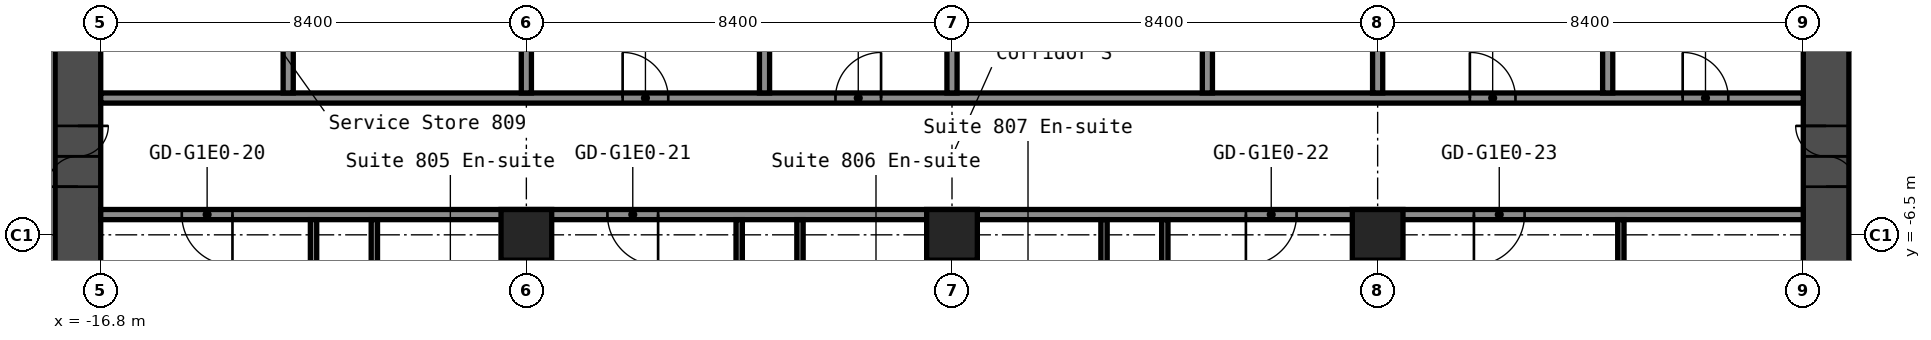
"""IFC4 building model, lengths in metres.
Left out: names, types, materials, properties, quantities, classifications, styles, units other than length and angle.
Written with IfcOpenShell. Run it as: python <this file> out.ifc"""

import sys

from ifc_helpers import new_model, si_unit, direction, frame, frame_2d, origin, origin_2d, place, context, subcontext, project, spatial, rectangle, hollow_rectangle, extrude, element, fill, save


model = new_model("IFC4")
c1 = context("Model", 3, precision=1e-05, world=origin(), true_north=direction((0.0, 1.0)))
c2 = subcontext(c1, "Body", "Model", "MODEL_VIEW")
j1 = project(units=[si_unit("LENGTHUNIT", "METRE"), si_unit("PLANEANGLEUNIT", "RADIAN")], contexts=[c1])
p1 = place(None, origin())
s1 = spatial("IfcSite", under=j1, at=p1, CompositionType="ELEMENT")
p2 = place(p1, origin())
s2 = spatial("IfcBuilding", under=s1, at=p2, CompositionType="ELEMENT")
p3 = place(p2, frame((0.0, 0.0, 32.6)))
s3 = spatial("IfcBuildingStorey", under=s2, at=p3, CompositionType="ELEMENT", Elevation=32.6)
for number, where, z_axis, x_axis in (
    (1, (-8.4, -6.5, 0.0), (0.0, 0.0, 1.0), (1.0, 0.0, 0.0)),
    (2, (0.0, -6.5, 0.0), (0.0, 0.0, 1.0), (1.0, 0.0, 0.0)),
    (3, (8.4, -6.5, 0.0), (0.0, 0.0, 1.0), (1.0, 0.0, 0.0)),
):
    element("IfcColumn", number, at=place(p3, frame(where, z_axis=z_axis, x_axis=x_axis)), inside=s3, PredefinedType="COLUMN", context=c2, shape_type="SweptSolid", body=[
        extrude(hollow_rectangle(XDim=1.0, YDim=1.0, WallThickness=0.04, at=origin_2d()), origin(), (0.0, 0.0, 1.0), 2.8),
    ])
p4 = place(p3, frame((-17.25, -8.4, 0.0), z_axis=(0.0, 0.0, 1.0), x_axis=(0.0, 1.0, 0.0)))
e4 = element("IfcWall", 4, at=p4, inside=s3, PredefinedType="SHEAR", context=c2, shape_type="SweptSolid", body=[
    extrude(rectangle(XDim=16.8, YDim=0.9, at=frame_2d((8.4, 0.0))), origin(), (0.0, 0.0, 1.0), 2.8),
])
p5 = place(p4, frame((12.75, 0.0, 0.0)))
e5 = element("IfcOpeningElement", 5, at=p5, cuts=e4, PredefinedType="OPENING", context=c2, shape_type="SweptSolid", body=[
    extrude(rectangle(XDim=1.2, YDim=2.1, at=frame_2d((0.6, 1.05))), frame((0.0, 0.46, 0.0), z_axis=(0.0, -1.0, 0.0), x_axis=(1.0, 0.0, 0.0)), (0.0, 0.0, 1.0), 0.92),
])
p6 = place(p4, frame((2.85, 0.0, 0.0)))
e6 = element("IfcOpeningElement", 6, at=p6, cuts=e4, PredefinedType="OPENING", context=c2, shape_type="SweptSolid", body=[
    extrude(rectangle(XDim=1.2, YDim=2.1, at=frame_2d((0.6, 1.05))), frame((0.0, 0.46, 0.0), z_axis=(0.0, -1.0, 0.0), x_axis=(1.0, 0.0, 0.0)), (0.0, 0.0, 1.0), 0.92),
])
p7 = place(p3, frame((17.25, -8.4, 0.0), z_axis=(0.0, 0.0, 1.0), x_axis=(0.0, 1.0, 0.0)))
e7 = element("IfcWall", 7, at=p7, inside=s3, PredefinedType="SHEAR", context=c2, shape_type="SweptSolid", body=[
    extrude(rectangle(XDim=16.8, YDim=0.9, at=frame_2d((8.4, 0.0))), origin(), (0.0, 0.0, 1.0), 2.8),
])
p8 = place(p7, frame((12.75, 0.0, 0.0)))
e8 = element("IfcOpeningElement", 8, at=p8, cuts=e7, PredefinedType="OPENING", context=c2, shape_type="SweptSolid", body=[
    extrude(rectangle(XDim=1.2, YDim=2.1, at=frame_2d((0.6, 1.05))), frame((0.0, 0.46, 0.0), z_axis=(0.0, -1.0, 0.0), x_axis=(1.0, 0.0, 0.0)), (0.0, 0.0, 1.0), 0.92),
])
p9 = place(p7, frame((2.85, 0.0, 0.0)))
e9 = element("IfcOpeningElement", 9, at=p9, cuts=e7, PredefinedType="OPENING", context=c2, shape_type="SweptSolid", body=[
    extrude(rectangle(XDim=1.2, YDim=2.1, at=frame_2d((0.6, 1.05))), frame((0.0, 0.46, 0.0), z_axis=(0.0, -1.0, 0.0), x_axis=(1.0, 0.0, 0.0)), (0.0, 0.0, 1.0), 0.92),
])
p10 = place(p3, frame((-16.8, -6.1, 0.0), z_axis=(0.0, 0.0, 1.0), x_axis=(1.0, 0.0, 0.0)))
e10 = element("IfcWall", 10, at=p10, inside=s3, PredefinedType="PARTITIONING", context=c2, shape_type="SweptSolid", body=[
    extrude(rectangle(XDim=33.6, YDim=0.2, at=frame_2d((16.8, 0.0))), origin(), (0.0, 0.0, 1.0), 2.8),
])
p11 = place(p10, frame((1.6, 0.0, 0.0)))
e11 = element("IfcOpeningElement", 11, at=p11, cuts=e10, PredefinedType="OPENING", context=c2, shape_type="SweptSolid", body=[
    extrude(rectangle(XDim=1.0, YDim=2.1, at=frame_2d((0.5, 1.05))), frame((0.0, 0.11, 0.0), z_axis=(0.0, -1.0, 0.0), x_axis=(1.0, 0.0, 0.0)), (0.0, 0.0, 1.0), 0.22),
])
p12 = place(p10, frame((10.0, 0.0, 0.0)))
e12 = element("IfcOpeningElement", 12, at=p12, cuts=e10, PredefinedType="OPENING", context=c2, shape_type="SweptSolid", body=[
    extrude(rectangle(XDim=1.0, YDim=2.1, at=frame_2d((0.5, 1.05))), frame((0.0, 0.11, 0.0), z_axis=(0.0, -1.0, 0.0), x_axis=(1.0, 0.0, 0.0)), (0.0, 0.0, 1.0), 0.22),
])
p13 = place(p10, frame((22.6, 0.0, 0.0)))
e13 = element("IfcOpeningElement", 13, at=p13, cuts=e10, PredefinedType="OPENING", context=c2, shape_type="SweptSolid", body=[
    extrude(rectangle(XDim=1.0, YDim=2.1, at=frame_2d((0.5, 1.05))), frame((0.0, 0.11, 0.0), z_axis=(0.0, -1.0, 0.0), x_axis=(1.0, 0.0, 0.0)), (0.0, 0.0, 1.0), 0.22),
])
p14 = place(p10, frame((27.1, 0.0, 0.0)))
e14 = element("IfcOpeningElement", 14, at=p14, cuts=e10, PredefinedType="OPENING", context=c2, shape_type="SweptSolid", body=[
    extrude(rectangle(XDim=1.0, YDim=2.1, at=frame_2d((0.5, 1.05))), frame((0.0, 0.11, 0.0), z_axis=(0.0, -1.0, 0.0), x_axis=(1.0, 0.0, 0.0)), (0.0, 0.0, 1.0), 0.22),
])
p15 = place(p3, frame((-16.8, -3.8, 0.0), z_axis=(0.0, 0.0, 1.0), x_axis=(1.0, 0.0, 0.0)))
e15 = element("IfcWall", 15, at=p15, inside=s3, PredefinedType="PARTITIONING", context=c2, shape_type="SweptSolid", body=[
    extrude(rectangle(XDim=33.6, YDim=0.2, at=frame_2d((16.8, 0.0))), origin(), (0.0, 0.0, 1.0), 2.8),
])
p16 = place(p15, frame((10.3, 0.0, 0.0)))
e16 = element("IfcOpeningElement", 16, at=p16, cuts=e15, PredefinedType="OPENING", context=c2, shape_type="SweptSolid", body=[
    extrude(rectangle(XDim=0.9, YDim=2.1, at=frame_2d((0.45, 1.05))), frame((0.0, 0.11, 0.0), z_axis=(0.0, -1.0, 0.0), x_axis=(1.0, 0.0, 0.0)), (0.0, 0.0, 1.0), 0.22),
])
p17 = place(p15, frame((14.5, 0.0, 0.0)))
e17 = element("IfcOpeningElement", 17, at=p17, cuts=e15, PredefinedType="OPENING", context=c2, shape_type="SweptSolid", body=[
    extrude(rectangle(XDim=0.9, YDim=2.1, at=frame_2d((0.45, 1.05))), frame((0.0, 0.11, 0.0), z_axis=(0.0, -1.0, 0.0), x_axis=(1.0, 0.0, 0.0)), (0.0, 0.0, 1.0), 0.22),
])
p18 = place(p15, frame((27.02, 0.0, 0.0)))
e18 = element("IfcOpeningElement", 18, at=p18, cuts=e15, PredefinedType="OPENING", context=c2, shape_type="SweptSolid", body=[
    extrude(rectangle(XDim=0.9, YDim=2.1, at=frame_2d((0.45, 1.05))), frame((0.0, 0.11, 0.0), z_axis=(0.0, -1.0, 0.0), x_axis=(1.0, 0.0, 0.0)), (0.0, 0.0, 1.0), 0.22),
])
p19 = place(p15, frame((31.22, 0.0, 0.0)))
e19 = element("IfcOpeningElement", 19, at=p19, cuts=e15, PredefinedType="OPENING", context=c2, shape_type="SweptSolid", body=[
    extrude(rectangle(XDim=0.9, YDim=2.1, at=frame_2d((0.45, 1.05))), frame((0.0, 0.11, 0.0), z_axis=(0.0, -1.0, 0.0), x_axis=(1.0, 0.0, 0.0)), (0.0, 0.0, 1.0), 0.22),
])
p20 = place(p3, frame((-13.1, -3.7, 0.0), z_axis=(0.0, 0.0, 1.0), x_axis=(0.0, 1.0, 0.0)))
e20 = element("IfcWall", 20, at=p20, inside=s3, PredefinedType="PARTITIONING", context=c2, shape_type="SweptSolid", body=[
    extrude(rectangle(XDim=7.4, YDim=0.2, at=frame_2d((3.7, 0.0))), origin(), (0.0, 0.0, 1.0), 2.8),
])
p21 = place(p3, frame((-12.6, -20.3, 0.0), z_axis=(0.0, 0.0, 1.0), x_axis=(0.0, 1.0, 0.0)))
e21 = element("IfcWall", 21, at=p21, inside=s3, PredefinedType="PARTITIONING", context=c2, shape_type="SweptSolid", body=[
    extrude(rectangle(XDim=14.1, YDim=0.125, at=frame_2d((7.05, 0.0))), origin(), (0.0, 0.0, 1.0), 2.8),
])
p22 = place(p21, frame((9.15, 0.0, 0.0)))
e22 = element("IfcOpeningElement", 22, at=p22, cuts=e21, PredefinedType="OPENING", context=c2, shape_type="SweptSolid", body=[
    extrude(rectangle(XDim=0.9, YDim=2.1, at=frame_2d((0.45, 1.05))), frame((0.0, 0.073, 0.0), z_axis=(0.0, -1.0, 0.0), x_axis=(1.0, 0.0, 0.0)), (0.0, 0.0, 1.0), 0.145),
])
p23 = place(p3, frame((-11.4, -9.3, 0.0), z_axis=(0.0, 0.0, 1.0), x_axis=(0.0, 1.0, 0.0)))
e23 = element("IfcWall", 23, at=p23, inside=s3, PredefinedType="PARTITIONING", context=c2, shape_type="SweptSolid", body=[
    extrude(rectangle(XDim=3.1, YDim=0.125, at=frame_2d((1.55, 0.0))), origin(), (0.0, 0.0, 1.0), 2.8),
])
p24 = place(p3, frame((-8.4, -20.3, 0.0), z_axis=(0.0, 0.0, 1.0), x_axis=(0.0, 1.0, 0.0)))
e24 = element("IfcWall", 24, at=p24, inside=s3, PredefinedType="PARTITIONING", context=c2, shape_type="SweptSolid", body=[
    extrude(rectangle(XDim=13.31, YDim=0.2, at=frame_2d((6.655, 0.0))), origin(), (0.0, 0.0, 1.0), 2.8),
])
p25 = place(p3, frame((-8.4, -3.7, 0.0), z_axis=(0.0, 0.0, 1.0), x_axis=(0.0, 1.0, 0.0)))
e25 = element("IfcWall", 25, at=p25, inside=s3, PredefinedType="PARTITIONING", context=c2, shape_type="SweptSolid", body=[
    extrude(rectangle(XDim=7.4, YDim=0.2, at=frame_2d((3.7, 0.0))), origin(), (0.0, 0.0, 1.0), 2.8),
])
p26 = place(p3, frame((-4.2, -20.3, 0.0), z_axis=(0.0, 0.0, 1.0), x_axis=(0.0, 1.0, 0.0)))
e26 = element("IfcWall", 26, at=p26, inside=s3, PredefinedType="PARTITIONING", context=c2, shape_type="SweptSolid", body=[
    extrude(rectangle(XDim=14.1, YDim=0.125, at=frame_2d((7.05, 0.0))), origin(), (0.0, 0.0, 1.0), 2.8),
])
p27 = place(p26, frame((9.15, 0.0, 0.0)))
e27 = element("IfcOpeningElement", 27, at=p27, cuts=e26, PredefinedType="OPENING", context=c2, shape_type="SweptSolid", body=[
    extrude(rectangle(XDim=0.9, YDim=2.1, at=frame_2d((0.45, 1.05))), frame((0.0, 0.073, 0.0), z_axis=(0.0, -1.0, 0.0), x_axis=(1.0, 0.0, 0.0)), (0.0, 0.0, 1.0), 0.145),
])
p28 = place(p3, frame((-3.7, -3.7, 0.0), z_axis=(0.0, 0.0, 1.0), x_axis=(0.0, 1.0, 0.0)))
e28 = element("IfcWall", 28, at=p28, inside=s3, PredefinedType="PARTITIONING", context=c2, shape_type="SweptSolid", body=[
    extrude(rectangle(XDim=7.4, YDim=0.2, at=frame_2d((3.7, 0.0))), origin(), (0.0, 0.0, 1.0), 2.8),
])
p29 = place(p3, frame((-3.0, -9.3, 0.0), z_axis=(0.0, 0.0, 1.0), x_axis=(0.0, 1.0, 0.0)))
e29 = element("IfcWall", 29, at=p29, inside=s3, PredefinedType="PARTITIONING", context=c2, shape_type="SweptSolid", body=[
    extrude(rectangle(XDim=3.1, YDim=0.125, at=frame_2d((1.55, 0.0))), origin(), (0.0, 0.0, 1.0), 2.8),
])
p30 = place(p3, frame((0.0, -20.3, 0.0), z_axis=(0.0, 0.0, 1.0), x_axis=(0.0, 1.0, 0.0)))
e30 = element("IfcWall", 30, at=p30, inside=s3, PredefinedType="PARTITIONING", context=c2, shape_type="SweptSolid", body=[
    extrude(rectangle(XDim=13.31, YDim=0.2, at=frame_2d((6.655, 0.0))), origin(), (0.0, 0.0, 1.0), 2.8),
])
p31 = place(p3, frame((0.0, -3.7, 0.0), z_axis=(0.0, 0.0, 1.0), x_axis=(0.0, 1.0, 0.0)))
e31 = element("IfcWall", 31, at=p31, inside=s3, PredefinedType="PARTITIONING", context=c2, shape_type="SweptSolid", body=[
    extrude(rectangle(XDim=7.4, YDim=0.2, at=frame_2d((3.7, 0.0))), origin(), (0.0, 0.0, 1.0), 2.8),
])
p32 = place(p3, frame((3.0, -9.3, 0.0), z_axis=(0.0, 0.0, 1.0), x_axis=(0.0, 1.0, 0.0)))
e32 = element("IfcWall", 32, at=p32, inside=s3, PredefinedType="PARTITIONING", context=c2, shape_type="SweptSolid", body=[
    extrude(rectangle(XDim=3.1, YDim=0.125, at=frame_2d((1.55, 0.0))), origin(), (0.0, 0.0, 1.0), 2.8),
])
p33 = place(p3, frame((4.2, -20.3, 0.0), z_axis=(0.0, 0.0, 1.0), x_axis=(0.0, 1.0, 0.0)))
e33 = element("IfcWall", 33, at=p33, inside=s3, PredefinedType="PARTITIONING", context=c2, shape_type="SweptSolid", body=[
    extrude(rectangle(XDim=14.1, YDim=0.125, at=frame_2d((7.05, 0.0))), origin(), (0.0, 0.0, 1.0), 2.8),
])
p34 = place(p33, frame((9.15, 0.0, 0.0)))
e34 = element("IfcOpeningElement", 34, at=p34, cuts=e33, PredefinedType="OPENING", context=c2, shape_type="SweptSolid", body=[
    extrude(rectangle(XDim=0.9, YDim=2.1, at=frame_2d((0.45, 1.05))), frame((0.0, 0.073, 0.0), z_axis=(0.0, -1.0, 0.0), x_axis=(1.0, 0.0, 0.0)), (0.0, 0.0, 1.0), 0.145),
])
p35 = place(p3, frame((5.04, -3.7, 0.0), z_axis=(0.0, 0.0, 1.0), x_axis=(0.0, 1.0, 0.0)))
e35 = element("IfcWall", 35, at=p35, inside=s3, PredefinedType="PARTITIONING", context=c2, shape_type="SweptSolid", body=[
    extrude(rectangle(XDim=7.4, YDim=0.2, at=frame_2d((3.7, 0.0))), origin(), (0.0, 0.0, 1.0), 2.8),
])
p36 = place(p3, frame((8.4, -20.3, 0.0), z_axis=(0.0, 0.0, 1.0), x_axis=(0.0, 1.0, 0.0)))
e36 = element("IfcWall", 36, at=p36, inside=s3, PredefinedType="PARTITIONING", context=c2, shape_type="SweptSolid", body=[
    extrude(rectangle(XDim=13.31, YDim=0.2, at=frame_2d((6.655, 0.0))), origin(), (0.0, 0.0, 1.0), 2.8),
])
for number, where, z_axis, x_axis in (
    (37, (8.4, -3.7, 0.0), (0.0, 0.0, 1.0), (0.0, 1.0, 0.0)),
    (38, (12.94, -3.7, 0.0), (0.0, 0.0, 1.0), (0.0, 1.0, 0.0)),
):
    element("IfcWall", number, at=place(p3, frame(where, z_axis=z_axis, x_axis=x_axis)), inside=s3, PredefinedType="PARTITIONING", context=c2, shape_type="SweptSolid", body=[
        extrude(rectangle(XDim=7.4, YDim=0.2, at=frame_2d((3.7, 0.0))), origin(), (0.0, 0.0, 1.0), 2.8),
    ])
p37 = place(p3, frame((13.2, -9.5, 0.0), z_axis=(0.0, 0.0, 1.0), x_axis=(0.0, 1.0, 0.0)))
e39 = element("IfcWall", 39, at=p37, inside=s3, PredefinedType="PARTITIONING", context=c2, shape_type="SweptSolid", body=[
    extrude(rectangle(XDim=3.3, YDim=0.125, at=frame_2d((1.65, 0.0))), origin(), (0.0, 0.0, 1.0), 2.8),
])
p38 = place(p37, frame((1.2, 0.0, 0.0)))
e40 = element("IfcOpeningElement", 40, at=p38, cuts=e39, PredefinedType="OPENING", context=c2, shape_type="SweptSolid", body=[
    extrude(rectangle(XDim=1.0, YDim=2.1, at=frame_2d((0.5, 1.05))), frame((0.0, 0.073, 0.0), z_axis=(0.0, -1.0, 0.0), x_axis=(1.0, 0.0, 0.0)), (0.0, 0.0, 1.0), 0.145),
])
p39 = place(p6, origin())
e41 = element("IfcDoor", 41, at=p39, inside=s3, OperationType="DOUBLE_DOOR_SINGLE_SWING", PredefinedType="DOOR", context=c2, shape_type="SweptSolid", body=[
    extrude(rectangle(XDim=1.2, YDim=2.1, at=frame_2d((0.6, 1.05))), frame((0.0, 0.025, 0.0), z_axis=(0.0, -1.0, 0.0), x_axis=(1.0, 0.0, 0.0)), (0.0, 0.0, 1.0), 0.05),
])
fill(e6, e41)
p40 = place(p9, origin())
e42 = element("IfcDoor", 42, at=p40, inside=s3, OperationType="DOUBLE_DOOR_SINGLE_SWING", PredefinedType="DOOR", context=c2, shape_type="SweptSolid", body=[
    extrude(rectangle(XDim=1.2, YDim=2.1, at=frame_2d((0.6, 1.05))), frame((0.0, 0.025, 0.0), z_axis=(0.0, -1.0, 0.0), x_axis=(1.0, 0.0, 0.0)), (0.0, 0.0, 1.0), 0.05),
])
fill(e9, e42)
p41 = place(p11, origin())
e43 = element("IfcDoor", 43, at=p41, inside=s3, OperationType="SINGLE_SWING_RIGHT", PredefinedType="DOOR", context=c2, shape_type="SweptSolid", body=[
    extrude(rectangle(XDim=1.0, YDim=2.1, at=frame_2d((0.5, 1.05))), frame((0.0, 0.025, 0.0), z_axis=(0.0, -1.0, 0.0), x_axis=(1.0, 0.0, 0.0)), (0.0, 0.0, 1.0), 0.05),
])
fill(e11, e43)
p42 = place(p12, origin())
e44 = element("IfcDoor", 44, at=p42, inside=s3, OperationType="SINGLE_SWING_RIGHT", PredefinedType="DOOR", context=c2, shape_type="SweptSolid", body=[
    extrude(rectangle(XDim=1.0, YDim=2.1, at=frame_2d((0.5, 1.05))), frame((0.0, 0.025, 0.0), z_axis=(0.0, -1.0, 0.0), x_axis=(1.0, 0.0, 0.0)), (0.0, 0.0, 1.0), 0.05),
])
fill(e12, e44)
p43 = place(p13, origin())
e45 = element("IfcDoor", 45, at=p43, inside=s3, OperationType="SINGLE_SWING_LEFT", PredefinedType="DOOR", context=c2, shape_type="SweptSolid", body=[
    extrude(rectangle(XDim=1.0, YDim=2.1, at=frame_2d((0.5, 1.05))), frame((0.0, 0.025, 0.0), z_axis=(0.0, -1.0, 0.0), x_axis=(1.0, 0.0, 0.0)), (0.0, 0.0, 1.0), 0.05),
])
fill(e13, e45)
p44 = place(p14, origin())
e46 = element("IfcDoor", 46, at=p44, inside=s3, OperationType="SINGLE_SWING_LEFT", PredefinedType="DOOR", context=c2, shape_type="SweptSolid", body=[
    extrude(rectangle(XDim=1.0, YDim=2.1, at=frame_2d((0.5, 1.05))), frame((0.0, 0.025, 0.0), z_axis=(0.0, -1.0, 0.0), x_axis=(1.0, 0.0, 0.0)), (0.0, 0.0, 1.0), 0.05),
])
fill(e14, e46)
p45 = place(p16, origin())
e47 = element("IfcDoor", 47, at=p45, inside=s3, OperationType="SINGLE_SWING_RIGHT", PredefinedType="DOOR", context=c2, shape_type="SweptSolid", body=[
    extrude(rectangle(XDim=0.9, YDim=2.1, at=frame_2d((0.45, 1.05))), frame((0.0, 0.025, 0.0), z_axis=(0.0, -1.0, 0.0), x_axis=(1.0, 0.0, 0.0)), (0.0, 0.0, 1.0), 0.05),
])
fill(e16, e47)
p46 = place(p17, origin())
e48 = element("IfcDoor", 48, at=p46, inside=s3, OperationType="SINGLE_SWING_LEFT", PredefinedType="DOOR", context=c2, shape_type="SweptSolid", body=[
    extrude(rectangle(XDim=0.9, YDim=2.1, at=frame_2d((0.45, 1.05))), frame((0.0, 0.025, 0.0), z_axis=(0.0, -1.0, 0.0), x_axis=(1.0, 0.0, 0.0)), (0.0, 0.0, 1.0), 0.05),
])
fill(e17, e48)
p47 = place(p18, origin())
e49 = element("IfcDoor", 49, at=p47, inside=s3, OperationType="SINGLE_SWING_RIGHT", PredefinedType="DOOR", context=c2, shape_type="SweptSolid", body=[
    extrude(rectangle(XDim=0.9, YDim=2.1, at=frame_2d((0.45, 1.05))), frame((0.0, 0.025, 0.0), z_axis=(0.0, -1.0, 0.0), x_axis=(1.0, 0.0, 0.0)), (0.0, 0.0, 1.0), 0.05),
])
fill(e18, e49)
p48 = place(p19, origin())
e50 = element("IfcDoor", 50, at=p48, inside=s3, OperationType="SINGLE_SWING_RIGHT", PredefinedType="DOOR", context=c2, shape_type="SweptSolid", body=[
    extrude(rectangle(XDim=0.9, YDim=2.1, at=frame_2d((0.45, 1.05))), frame((0.0, 0.025, 0.0), z_axis=(0.0, -1.0, 0.0), x_axis=(1.0, 0.0, 0.0)), (0.0, 0.0, 1.0), 0.05),
])
fill(e19, e50)
save(model, sys.argv[1])
